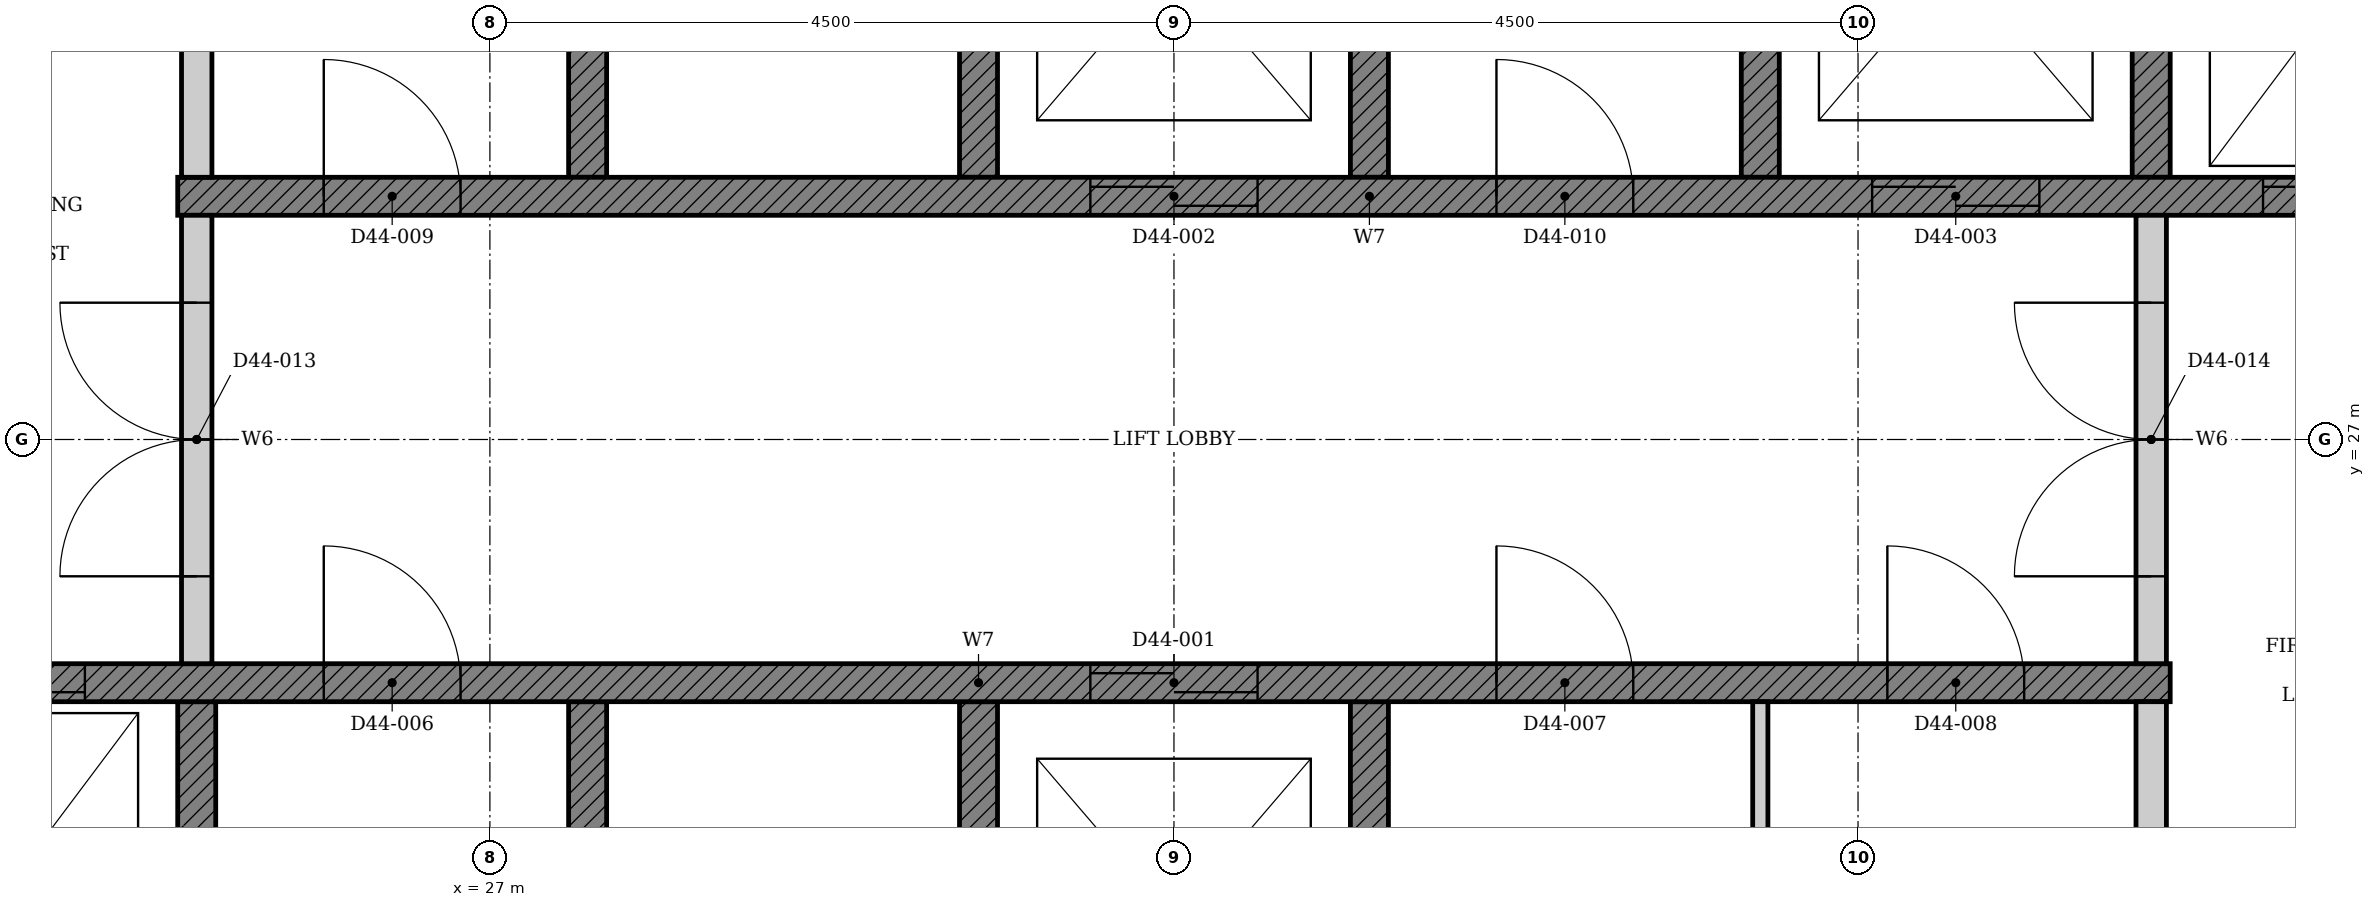
"""IFC4 building model, lengths in metres.
Left out: names, types, materials, properties, quantities, classifications, styles, units other than length and angle.
Written with IfcOpenShell. Run it as: python <this file> out.ifc"""

import sys

from ifc_helpers import new_model, si_unit, direction, frame, frame_2d, origin, place, context, subcontext, project, spatial, polyline, rectangle, outline, extrude, element, fill, save


model = new_model("IFC4")
c1 = context("Model", 3, precision=1e-05, world=origin(), true_north=direction((0.0, 1.0)))
c2 = subcontext(c1, "Body", "Model", "MODEL_VIEW")
j1 = project(units=[si_unit("LENGTHUNIT", "METRE"), si_unit("PLANEANGLEUNIT", "RADIAN")], contexts=[c1])
p1 = place(None, origin())
s1 = spatial("IfcSite", under=j1, at=p1, CompositionType="ELEMENT")
p2 = place(p1, origin())
s2 = spatial("IfcBuilding", under=s1, at=p2, CompositionType="ELEMENT")
p3 = place(p2, frame((0.0, 0.0, 176.5)))
s3 = spatial("IfcBuildingStorey", under=s2, at=p3, CompositionType="ELEMENT", Elevation=176.5)
p4 = place(p3, origin())
e1 = element("IfcWall", 1, at=p4, inside=s3, PredefinedType="SHEAR", context=c2, shape_type="SweptSolid", body=[
    extrude(outline(polyline([(22.375, 22.35), (25.197, 22.35), (25.197, 25.275), (24.947, 25.275), (24.947, 22.65), (22.625, 22.65), (22.625, 25.275), (22.375, 25.275), (22.375, 22.35)])), origin(), (0.0, 0.0, 1.0), 3.4),
])
p5 = place(p3, origin())
e2 = element("IfcWall", 2, at=p5, inside=s3, PredefinedType="SHEAR", context=c2, shape_type="SweptSolid", body=[
    extrude(outline(polyline([(27.518, 22.35), (32.911, 22.35), (32.911, 25.275), (32.661, 25.275), (32.661, 22.65), (30.339, 22.65), (30.339, 25.275), (30.089, 25.275), (30.089, 22.65), (27.768, 22.65), (27.768, 25.275), (27.518, 25.275), (27.518, 22.35)])), origin(), (0.0, 0.0, 1.0), 3.4),
])
p6 = place(p3, origin())
e3 = element("IfcWall", 3, at=p6, inside=s3, PredefinedType="SHEAR", context=c2, shape_type="SweptSolid", body=[
    extrude(outline(polyline([(27.518, 28.725), (27.768, 28.725), (27.768, 31.35), (30.089, 31.35), (30.089, 28.725), (30.339, 28.725), (30.339, 31.35), (32.661, 31.35), (32.661, 28.725), (32.911, 28.725), (32.911, 31.65), (27.518, 31.65), (27.518, 28.725)])), origin(), (0.0, 0.0, 1.0), 3.4),
])
p7 = place(p3, origin())
e4 = element("IfcWall", 4, at=p7, inside=s3, PredefinedType="SHEAR", context=c2, shape_type="SweptSolid", body=[
    extrude(outline(polyline([(35.232, 28.725), (35.482, 28.725), (35.482, 31.35), (37.803, 31.35), (37.803, 28.725), (38.053, 28.725), (38.053, 31.35), (40.375, 31.35), (40.375, 28.725), (40.625, 28.725), (40.625, 31.65), (35.232, 31.65), (35.232, 28.725)])), origin(), (0.0, 0.0, 1.0), 3.4),
])
p8 = place(p3, frame((22.375, 25.4, 0.0), z_axis=(0.0, 0.0, 1.0), x_axis=(1.0, 0.0, 0.0)))
e5 = element("IfcWall", 5, at=p8, inside=s3, PredefinedType="SHEAR", context=c2, shape_type="SweptSolid", body=[
    extrude(rectangle(XDim=15.678, YDim=0.25, at=frame_2d((7.839, 0.0))), origin(), (0.0, 0.0, 1.0), 3.4),
])
p9 = place(p8, frame((8.575, 0.0, 0.0)))
e6 = element("IfcOpeningElement", 6, at=p9, cuts=e5, PredefinedType="OPENING", context=c2, shape_type="SweptSolid", body=[
    extrude(rectangle(XDim=1.1, YDim=2.1, at=frame_2d((0.55, 1.05))), frame((0.0, 0.135, 0.0), z_axis=(0.0, -1.0, 0.0), x_axis=(1.0, 0.0, 0.0)), (0.0, 0.0, 1.0), 0.27),
])
p10 = place(p8, frame((0.861, 0.0, 0.0)))
e7 = element("IfcOpeningElement", 7, at=p10, cuts=e5, PredefinedType="OPENING", context=c2, shape_type="SweptSolid", body=[
    extrude(rectangle(XDim=1.1, YDim=2.1, at=frame_2d((0.55, 1.05))), frame((0.0, 0.135, 0.0), z_axis=(0.0, -1.0, 0.0), x_axis=(1.0, 0.0, 0.0)), (0.0, 0.0, 1.0), 0.27),
])
p11 = place(p8, frame((3.532, 0.0, 0.0)))
e8 = element("IfcOpeningElement", 8, at=p11, cuts=e5, PredefinedType="OPENING", context=c2, shape_type="SweptSolid", body=[
    extrude(rectangle(XDim=0.9, YDim=2.1, at=frame_2d((0.45, 1.05))), frame((0.0, 0.135, 0.0), z_axis=(0.0, -1.0, 0.0), x_axis=(1.0, 0.0, 0.0)), (0.0, 0.0, 1.0), 0.27),
])
p12 = place(p8, frame((11.246, 0.0, 0.0)))
e9 = element("IfcOpeningElement", 9, at=p12, cuts=e5, PredefinedType="OPENING", context=c2, shape_type="SweptSolid", body=[
    extrude(rectangle(XDim=0.9, YDim=2.1, at=frame_2d((0.45, 1.05))), frame((0.0, 0.135, 0.0), z_axis=(0.0, -1.0, 0.0), x_axis=(1.0, 0.0, 0.0)), (0.0, 0.0, 1.0), 0.27),
])
p13 = place(p8, frame((13.818, 0.0, 0.0)))
e10 = element("IfcOpeningElement", 10, at=p13, cuts=e5, PredefinedType="OPENING", context=c2, shape_type="SweptSolid", body=[
    extrude(rectangle(XDim=0.9, YDim=2.1, at=frame_2d((0.45, 1.05))), frame((0.0, 0.135, 0.0), z_axis=(0.0, -1.0, 0.0), x_axis=(1.0, 0.0, 0.0)), (0.0, 0.0, 1.0), 0.27),
])
p14 = place(p3, frame((24.947, 28.6, 0.0), z_axis=(0.0, 0.0, 1.0), x_axis=(1.0, 0.0, 0.0)))
e11 = element("IfcWall", 11, at=p14, inside=s3, PredefinedType="SHEAR", context=c2, shape_type="SweptSolid", body=[
    extrude(rectangle(XDim=15.678, YDim=0.25, at=frame_2d((7.839, 0.0))), origin(), (0.0, 0.0, 1.0), 3.4),
])
p15 = place(p14, frame((6.004, 0.0, 0.0)))
e12 = element("IfcOpeningElement", 12, at=p15, cuts=e11, PredefinedType="OPENING", context=c2, shape_type="SweptSolid", body=[
    extrude(rectangle(XDim=1.1, YDim=2.1, at=frame_2d((0.55, 1.05))), frame((0.0, 0.135, 0.0), z_axis=(0.0, -1.0, 0.0), x_axis=(1.0, 0.0, 0.0)), (0.0, 0.0, 1.0), 0.27),
])
p16 = place(p14, frame((11.146, 0.0, 0.0)))
e13 = element("IfcOpeningElement", 13, at=p16, cuts=e11, PredefinedType="OPENING", context=c2, shape_type="SweptSolid", body=[
    extrude(rectangle(XDim=1.1, YDim=2.1, at=frame_2d((0.55, 1.05))), frame((0.0, 0.135, 0.0), z_axis=(0.0, -1.0, 0.0), x_axis=(1.0, 0.0, 0.0)), (0.0, 0.0, 1.0), 0.27),
])
p17 = place(p14, frame((13.718, 0.0, 0.0)))
e14 = element("IfcOpeningElement", 14, at=p17, cuts=e11, PredefinedType="OPENING", context=c2, shape_type="SweptSolid", body=[
    extrude(rectangle(XDim=1.1, YDim=2.1, at=frame_2d((0.55, 1.05))), frame((0.0, 0.135, 0.0), z_axis=(0.0, -1.0, 0.0), x_axis=(1.0, 0.0, 0.0)), (0.0, 0.0, 1.0), 0.27),
])
p18 = place(p14, frame((0.961, 0.0, 0.0)))
e15 = element("IfcOpeningElement", 15, at=p18, cuts=e11, PredefinedType="OPENING", context=c2, shape_type="SweptSolid", body=[
    extrude(rectangle(XDim=0.9, YDim=2.1, at=frame_2d((0.45, 1.05))), frame((0.0, 0.135, 0.0), z_axis=(0.0, -1.0, 0.0), x_axis=(1.0, 0.0, 0.0)), (0.0, 0.0, 1.0), 0.27),
])
p19 = place(p14, frame((8.675, 0.0, 0.0)))
e16 = element("IfcOpeningElement", 16, at=p19, cuts=e11, PredefinedType="OPENING", context=c2, shape_type="SweptSolid", body=[
    extrude(rectangle(XDim=0.9, YDim=2.1, at=frame_2d((0.45, 1.05))), frame((0.0, 0.135, 0.0), z_axis=(0.0, -1.0, 0.0), x_axis=(1.0, 0.0, 0.0)), (0.0, 0.0, 1.0), 0.27),
])
p20 = place(p3, frame((37.928, 22.65, 0.0), z_axis=(0.0, 0.0, 1.0), x_axis=(0.0, 1.0, 0.0)))
e17 = element("IfcWall", 17, at=p20, inside=s3, PredefinedType="PARTITIONING", context=c2, shape_type="SweptSolid", body=[
    extrude(rectangle(XDim=2.625, YDim=0.2, at=frame_2d((1.312, 0.0))), origin(), (0.0, 0.0, 1.0), 3.4),
])
p21 = place(p3, frame((35.357, 22.65, 0.0), z_axis=(0.0, 0.0, 1.0), x_axis=(0.0, 1.0, 0.0)))
e18 = element("IfcWall", 18, at=p21, inside=s3, PredefinedType="PARTITIONING", context=c2, shape_type="SweptSolid", body=[
    extrude(rectangle(XDim=2.625, YDim=0.1, at=frame_2d((1.312, 0.0))), origin(), (0.0, 0.0, 1.0), 3.4),
])
p22 = place(p3, frame((25.072, 28.725, 0.0), z_axis=(0.0, 0.0, 1.0), x_axis=(0.0, 1.0, 0.0)))
e19 = element("IfcWall", 19, at=p22, inside=s3, PredefinedType="PARTITIONING", context=c2, shape_type="SweptSolid", body=[
    extrude(rectangle(XDim=2.625, YDim=0.2, at=frame_2d((1.312, 0.0))), origin(), (0.0, 0.0, 1.0), 3.4),
])
p23 = place(p3, frame((25.072, 25.525, 0.0), z_axis=(0.0, 0.0, 1.0), x_axis=(0.0, 1.0, 0.0)))
e20 = element("IfcWall", 20, at=p23, inside=s3, PredefinedType="PARTITIONING", context=c2, shape_type="SweptSolid", body=[
    extrude(rectangle(XDim=2.95, YDim=0.2, at=frame_2d((1.475, 0.0))), origin(), (0.0, 0.0, 1.0), 3.4),
])
p24 = place(p23, frame((0.575, 0.0, 0.0)))
e21 = element("IfcOpeningElement", 21, at=p24, cuts=e20, PredefinedType="OPENING", context=c2, shape_type="SweptSolid", body=[
    extrude(rectangle(XDim=1.8, YDim=2.1, at=frame_2d((0.9, 1.05))), frame((0.0, 0.11, 0.0), z_axis=(0.0, -1.0, 0.0), x_axis=(1.0, 0.0, 0.0)), (0.0, 0.0, 1.0), 0.22),
])
p25 = place(p3, frame((37.928, 25.525, 0.0), z_axis=(0.0, 0.0, 1.0), x_axis=(0.0, 1.0, 0.0)))
e22 = element("IfcWall", 22, at=p25, inside=s3, PredefinedType="PARTITIONING", context=c2, shape_type="SweptSolid", body=[
    extrude(rectangle(XDim=2.95, YDim=0.2, at=frame_2d((1.475, 0.0))), origin(), (0.0, 0.0, 1.0), 3.4),
])
p26 = place(p25, frame((0.575, 0.0, 0.0)))
e23 = element("IfcOpeningElement", 23, at=p26, cuts=e22, PredefinedType="OPENING", context=c2, shape_type="SweptSolid", body=[
    extrude(rectangle(XDim=1.8, YDim=2.1, at=frame_2d((0.9, 1.05))), frame((0.0, 0.11, 0.0), z_axis=(0.0, -1.0, 0.0), x_axis=(1.0, 0.0, 0.0)), (0.0, 0.0, 1.0), 0.22),
])
p27 = place(p9, origin())
e24 = element("IfcDoor", 24, at=p27, inside=s3, OperationType="DOUBLE_DOOR_SLIDING", PredefinedType="DOOR", context=c2, shape_type="SweptSolid", body=[
    extrude(rectangle(XDim=1.1, YDim=2.1, at=frame_2d((0.55, 1.05))), frame((0.0, 0.025, 0.0), z_axis=(0.0, -1.0, 0.0), x_axis=(1.0, 0.0, 0.0)), (0.0, 0.0, 1.0), 0.05),
])
fill(e6, e24)
p28 = place(p15, origin())
e25 = element("IfcDoor", 25, at=p28, inside=s3, OperationType="DOUBLE_DOOR_SLIDING", PredefinedType="DOOR", context=c2, shape_type="SweptSolid", body=[
    extrude(rectangle(XDim=1.1, YDim=2.1, at=frame_2d((0.55, 1.05))), frame((0.0, 0.025, 0.0), z_axis=(0.0, -1.0, 0.0), x_axis=(1.0, 0.0, 0.0)), (0.0, 0.0, 1.0), 0.05),
])
fill(e12, e25)
p29 = place(p16, origin())
e26 = element("IfcDoor", 26, at=p29, inside=s3, OperationType="DOUBLE_DOOR_SLIDING", PredefinedType="DOOR", context=c2, shape_type="SweptSolid", body=[
    extrude(rectangle(XDim=1.1, YDim=2.1, at=frame_2d((0.55, 1.05))), frame((0.0, 0.025, 0.0), z_axis=(0.0, -1.0, 0.0), x_axis=(1.0, 0.0, 0.0)), (0.0, 0.0, 1.0), 0.05),
])
fill(e13, e26)
p30 = place(p10, origin())
e27 = element("IfcDoor", 27, at=p30, inside=s3, OperationType="DOUBLE_DOOR_SLIDING", PredefinedType="DOOR", context=c2, shape_type="SweptSolid", body=[
    extrude(rectangle(XDim=1.1, YDim=2.1, at=frame_2d((0.55, 1.05))), frame((0.0, 0.025, 0.0), z_axis=(0.0, -1.0, 0.0), x_axis=(1.0, 0.0, 0.0)), (0.0, 0.0, 1.0), 0.05),
])
fill(e7, e27)
p31 = place(p17, origin())
e28 = element("IfcDoor", 28, at=p31, inside=s3, OperationType="DOUBLE_DOOR_SLIDING", PredefinedType="DOOR", context=c2, shape_type="SweptSolid", body=[
    extrude(rectangle(XDim=1.1, YDim=2.1, at=frame_2d((0.55, 1.05))), frame((0.0, 0.025, 0.0), z_axis=(0.0, -1.0, 0.0), x_axis=(1.0, 0.0, 0.0)), (0.0, 0.0, 1.0), 0.05),
])
fill(e14, e28)
p32 = place(p11, origin())
e29 = element("IfcDoor", 29, at=p32, inside=s3, OperationType="SINGLE_SWING_LEFT", PredefinedType="DOOR", context=c2, shape_type="SweptSolid", body=[
    extrude(rectangle(XDim=0.9, YDim=2.1, at=frame_2d((0.45, 1.05))), frame((0.0, 0.025, 0.0), z_axis=(0.0, -1.0, 0.0), x_axis=(1.0, 0.0, 0.0)), (0.0, 0.0, 1.0), 0.05),
])
fill(e8, e29)
p33 = place(p12, origin())
e30 = element("IfcDoor", 30, at=p33, inside=s3, OperationType="SINGLE_SWING_LEFT", PredefinedType="DOOR", context=c2, shape_type="SweptSolid", body=[
    extrude(rectangle(XDim=0.9, YDim=2.1, at=frame_2d((0.45, 1.05))), frame((0.0, 0.025, 0.0), z_axis=(0.0, -1.0, 0.0), x_axis=(1.0, 0.0, 0.0)), (0.0, 0.0, 1.0), 0.05),
])
fill(e9, e30)
p34 = place(p13, origin())
e31 = element("IfcDoor", 31, at=p34, inside=s3, OperationType="SINGLE_SWING_LEFT", PredefinedType="DOOR", context=c2, shape_type="SweptSolid", body=[
    extrude(rectangle(XDim=0.9, YDim=2.1, at=frame_2d((0.45, 1.05))), frame((0.0, 0.025, 0.0), z_axis=(0.0, -1.0, 0.0), x_axis=(1.0, 0.0, 0.0)), (0.0, 0.0, 1.0), 0.05),
])
fill(e10, e31)
p35 = place(p18, origin())
e32 = element("IfcDoor", 32, at=p35, inside=s3, OperationType="SINGLE_SWING_LEFT", PredefinedType="DOOR", context=c2, shape_type="SweptSolid", body=[
    extrude(rectangle(XDim=0.9, YDim=2.1, at=frame_2d((0.45, 1.05))), frame((0.0, 0.025, 0.0), z_axis=(0.0, -1.0, 0.0), x_axis=(1.0, 0.0, 0.0)), (0.0, 0.0, 1.0), 0.05),
])
fill(e15, e32)
p36 = place(p19, origin())
e33 = element("IfcDoor", 33, at=p36, inside=s3, OperationType="SINGLE_SWING_LEFT", PredefinedType="DOOR", context=c2, shape_type="SweptSolid", body=[
    extrude(rectangle(XDim=0.9, YDim=2.1, at=frame_2d((0.45, 1.05))), frame((0.0, 0.025, 0.0), z_axis=(0.0, -1.0, 0.0), x_axis=(1.0, 0.0, 0.0)), (0.0, 0.0, 1.0), 0.05),
])
fill(e16, e33)
p37 = place(p24, origin())
e34 = element("IfcDoor", 34, at=p37, inside=s3, OperationType="DOUBLE_DOOR_SINGLE_SWING", PredefinedType="DOOR", context=c2, shape_type="SweptSolid", body=[
    extrude(rectangle(XDim=1.8, YDim=2.1, at=frame_2d((0.9, 1.05))), frame((0.0, 0.025, 0.0), z_axis=(0.0, -1.0, 0.0), x_axis=(1.0, 0.0, 0.0)), (0.0, 0.0, 1.0), 0.05),
])
fill(e21, e34)
p38 = place(p26, origin())
e35 = element("IfcDoor", 35, at=p38, inside=s3, OperationType="DOUBLE_DOOR_SINGLE_SWING", PredefinedType="DOOR", context=c2, shape_type="SweptSolid", body=[
    extrude(rectangle(XDim=1.8, YDim=2.1, at=frame_2d((0.9, 1.05))), frame((0.0, 0.025, 0.0), z_axis=(0.0, -1.0, 0.0), x_axis=(1.0, 0.0, 0.0)), (0.0, 0.0, 1.0), 0.05),
])
fill(e23, e35)
save(model, sys.argv[1])
